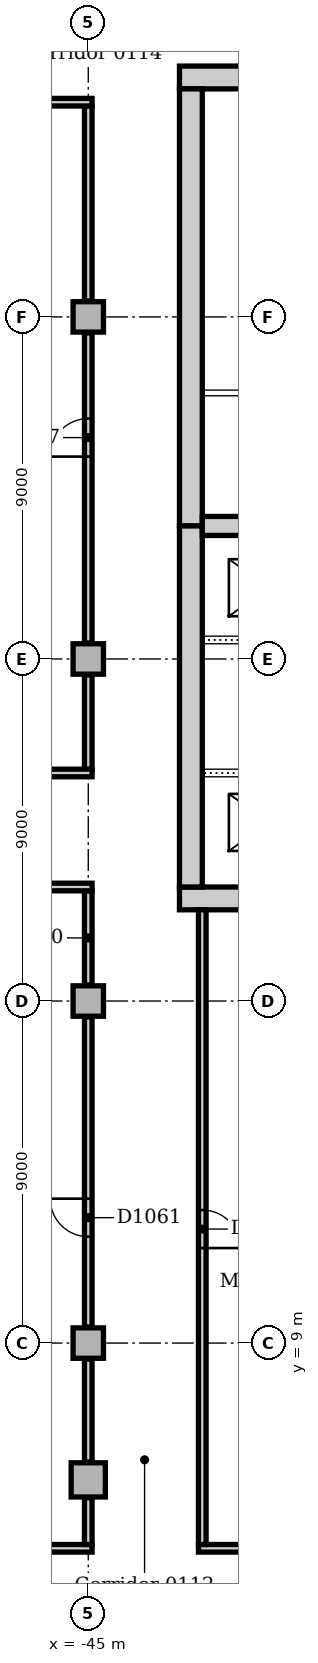
"""IFC4 building model, lengths in metres.
Left out: names, types, materials, properties, quantities, classifications, styles, units other than length and angle.
Written with IfcOpenShell. Run it as: python <this file> out.ifc"""

import sys

from ifc_helpers import new_model, si_unit, direction, frame, frame_2d, origin, origin_2d, place, context, subcontext, project, spatial, rectangle, extrude, element, fill, save


model = new_model("IFC4")
c1 = context("Model", 3, precision=1e-05, world=origin(), true_north=direction((0.0, 1.0)))
c2 = subcontext(c1, "Body", "Model", "MODEL_VIEW")
j1 = project(units=[si_unit("LENGTHUNIT", "METRE"), si_unit("PLANEANGLEUNIT", "RADIAN")], contexts=[c1])
p1 = place(None, origin())
s1 = spatial("IfcSite", under=j1, at=p1, CompositionType="ELEMENT")
p2 = place(p1, origin())
s2 = spatial("IfcBuilding", under=s1, at=p2, CompositionType="ELEMENT")
p3 = place(p2, frame((0.0, 0.0, 6.0)))
s3 = spatial("IfcBuildingStorey", under=s2, at=p3, CompositionType="ELEMENT", Elevation=6.0)
for number, where, z_axis, x_axis in (
    (1, (-42.6, 20.7, 0.0), (0.0, 0.0, 1.0), (1.0, 0.0, 0.0)),
    (2, (-30.9, 42.3, 0.0), (0.0, 0.0, 1.0), (-1.0, 0.0, 0.0)),
):
    element("IfcWall", number, at=place(p3, frame(where, z_axis=z_axis, x_axis=x_axis)), inside=s3, PredefinedType="SOLIDWALL", context=c2, shape_type="SweptSolid", body=[
        extrude(rectangle(XDim=11.7, YDim=0.6, at=frame_2d((5.85, 0.0))), origin(), (0.0, 0.0, 1.0), 5.0),
    ])
p4 = place(p3, frame((-42.3, 42.0, 0.0), z_axis=(0.0, 0.0, 1.0), x_axis=(0.0, -1.0, 0.0)))
e3 = element("IfcWall", 3, at=p4, inside=s3, PredefinedType="SOLIDWALL", context=c2, shape_type="SweptSolid", body=[
    extrude(rectangle(XDim=11.5, YDim=0.6, at=frame_2d((5.75, 0.0))), origin(), (0.0, 0.0, 1.0), 5.0),
])
p5 = place(p4, frame((8.85, 0.0, 0.0)))
e4 = element("IfcOpeningElement", 4, at=p5, cuts=e3, PredefinedType="OPENING", context=c2, shape_type="SweptSolid", body=[
    extrude(rectangle(XDim=1.8, YDim=2.1, at=frame_2d((0.9, 1.05))), frame((0.0, 0.31, 0.0), z_axis=(0.0, -1.0, 0.0), x_axis=(1.0, 0.0, 0.0)), (0.0, 0.0, 1.0), 0.62),
])
p6 = place(p3, frame((-42.3, 30.5, 0.0), z_axis=(0.0, 0.0, 1.0), x_axis=(0.0, -1.0, 0.0)))
e5 = element("IfcWall", 5, at=p6, inside=s3, PredefinedType="SOLIDWALL", context=c2, shape_type="SweptSolid", body=[
    extrude(rectangle(XDim=9.5, YDim=0.6, at=frame_2d((4.75, 0.0))), origin(), (0.0, 0.0, 1.0), 5.0),
])
p7 = place(p6, frame((3.85, 0.0, 0.0)))
e6 = element("IfcOpeningElement", 6, at=p7, cuts=e5, PredefinedType="OPENING", context=c2, shape_type="SweptSolid", body=[
    extrude(rectangle(XDim=1.8, YDim=2.1, at=frame_2d((0.9, 1.05))), frame((0.0, 0.31, 0.0), z_axis=(0.0, -1.0, 0.0), x_axis=(1.0, 0.0, 0.0)), (0.0, 0.0, 1.0), 0.62),
])
p8 = place(p3, frame((-42.0, 30.5, 0.0), z_axis=(0.0, 0.0, 1.0), x_axis=(1.0, 0.0, 0.0)))
e7 = element("IfcWall", 7, at=p8, inside=s3, PredefinedType="SOLIDWALL", context=c2, shape_type="SweptSolid", body=[
    extrude(rectangle(XDim=10.5, YDim=0.5, at=frame_2d((5.25, 0.0))), origin(), (0.0, 0.0, 1.0), 5.0),
])
p9 = place(p3, frame((-45.0, 5.4, 0.0), z_axis=(0.0, 0.0, 1.0), x_axis=(1.0, 0.0, 0.0)))
e8 = element("IfcColumn", 8, at=p9, inside=s3, PredefinedType="COLUMN", context=c2, shape_type="SweptSolid", body=[
    extrude(rectangle(XDim=0.9, YDim=0.9, at=origin_2d()), origin(), (0.0, 0.0, 1.0), 4.7),
])
for number, where, z_axis, x_axis in (
    (9, (-45.0, 9.0, 0.0), (0.0, 0.0, 1.0), (1.0, 0.0, 0.0)),
    (10, (-45.0, 18.0, 0.0), (0.0, 0.0, 1.0), (1.0, 0.0, 0.0)),
    (11, (-45.0, 27.0, 0.0), (0.0, 0.0, 1.0), (1.0, 0.0, 0.0)),
    (12, (-45.0, 36.0, 0.0), (0.0, 0.0, 1.0), (1.0, 0.0, 0.0)),
):
    element("IfcColumn", number, at=place(p3, frame(where, z_axis=z_axis, x_axis=x_axis)), inside=s3, PredefinedType="COLUMN", context=c2, shape_type="SweptSolid", body=[
        extrude(rectangle(XDim=0.8, YDim=0.8, at=origin_2d()), origin(), (0.0, 0.0, 1.0), 4.7),
    ])
p10 = place(p3, frame((-54.0, 3.6, 0.0), z_axis=(0.0, 0.0, 1.0), x_axis=(1.0, 0.0, 0.0)))
e13 = element("IfcWall", 13, at=p10, inside=s3, PredefinedType="PARTITIONING", context=c2, shape_type="SweptSolid", body=[
    extrude(rectangle(XDim=9.1, YDim=0.2, at=frame_2d((4.55, 0.0))), origin(), (0.0, 0.0, 1.0), 4.7),
])
p11 = place(p3, frame((-42.1, 3.6, 0.0), z_axis=(0.0, 0.0, 1.0), x_axis=(1.0, 0.0, 0.0)))
e14 = element("IfcWall", 14, at=p11, inside=s3, PredefinedType="PARTITIONING", context=c2, shape_type="SweptSolid", body=[
    extrude(rectangle(XDim=6.1, YDim=0.2, at=frame_2d((3.05, 0.0))), origin(), (0.0, 0.0, 1.0), 4.7),
])
p12 = place(p3, frame((-45.0, 3.7, 0.0), z_axis=(0.0, 0.0, 1.0), x_axis=(0.0, 1.0, 0.0)))
e15 = element("IfcWall", 15, at=p12, inside=s3, PredefinedType="PARTITIONING", context=c2, shape_type="SweptSolid", body=[
    extrude(rectangle(XDim=1.23, YDim=0.2, at=frame_2d((0.615, 0.0))), origin(), (0.0, 0.0, 1.0), 4.7),
])
p13 = place(p3, frame((-45.0, 5.87, 0.0), z_axis=(0.0, 0.0, 1.0), x_axis=(0.0, 1.0, 0.0)))
e16 = element("IfcWall", 16, at=p13, inside=s3, PredefinedType="PARTITIONING", context=c2, shape_type="SweptSolid", body=[
    extrude(rectangle(XDim=2.71, YDim=0.2, at=frame_2d((1.355, 0.0))), origin(), (0.0, 0.0, 1.0), 4.7),
])
p14 = place(p3, frame((-45.0, 9.42, 0.0), z_axis=(0.0, 0.0, 1.0), x_axis=(0.0, 1.0, 0.0)))
e17 = element("IfcWall", 17, at=p14, inside=s3, PredefinedType="PARTITIONING", context=c2, shape_type="SweptSolid", body=[
    extrude(rectangle(XDim=8.16, YDim=0.2, at=frame_2d((4.08, 0.0))), origin(), (0.0, 0.0, 1.0), 4.7),
])
p15 = place(p14, frame((2.38, 0.0, 0.0)))
e18 = element("IfcOpeningElement", 18, at=p15, cuts=e17, PredefinedType="OPENING", context=c2, shape_type="SweptSolid", body=[
    extrude(rectangle(XDim=1.0, YDim=2.1, at=frame_2d((0.5, 1.05))), frame((0.0, 0.11, 0.0), z_axis=(0.0, -1.0, 0.0), x_axis=(1.0, 0.0, 0.0)), (0.0, 0.0, 1.0), 0.22),
])
p16 = place(p3, frame((-45.0, 18.42, 0.0), z_axis=(0.0, 0.0, 1.0), x_axis=(0.0, 1.0, 0.0)))
e19 = element("IfcWall", 19, at=p16, inside=s3, PredefinedType="PARTITIONING", context=c2, shape_type="SweptSolid", body=[
    extrude(rectangle(XDim=2.48, YDim=0.2, at=frame_2d((1.24, 0.0))), origin(), (0.0, 0.0, 1.0), 4.7),
])
p17 = place(p3, frame((-42.0, 3.7, 0.0), z_axis=(0.0, 0.0, 1.0), x_axis=(0.0, 1.0, 0.0)))
e20 = element("IfcWall", 20, at=p17, inside=s3, PredefinedType="PARTITIONING", context=c2, shape_type="SweptSolid", body=[
    extrude(rectangle(XDim=16.7, YDim=0.2, at=frame_2d((8.35, 0.0))), origin(), (0.0, 0.0, 1.0), 4.7),
])
p18 = place(p17, frame((7.8, 0.0, 0.0)))
e21 = element("IfcOpeningElement", 21, at=p18, cuts=e20, PredefinedType="OPENING", context=c2, shape_type="SweptSolid", body=[
    extrude(rectangle(XDim=1.0, YDim=2.1, at=frame_2d((0.5, 1.05))), frame((0.0, 0.11, 0.0), z_axis=(0.0, -1.0, 0.0), x_axis=(1.0, 0.0, 0.0)), (0.0, 0.0, 1.0), 0.22),
])
p19 = place(p3, frame((-45.0, 24.1, 0.0), z_axis=(0.0, 0.0, 1.0), x_axis=(0.0, 1.0, 0.0)))
e22 = element("IfcWall", 22, at=p19, inside=s3, PredefinedType="PARTITIONING", context=c2, shape_type="SweptSolid", body=[
    extrude(rectangle(XDim=2.48, YDim=0.2, at=frame_2d((1.24, 0.0))), origin(), (0.0, 0.0, 1.0), 4.7),
])
p20 = place(p3, frame((-45.0, 27.42, 0.0), z_axis=(0.0, 0.0, 1.0), x_axis=(0.0, 1.0, 0.0)))
e23 = element("IfcWall", 23, at=p20, inside=s3, PredefinedType="PARTITIONING", context=c2, shape_type="SweptSolid", body=[
    extrude(rectangle(XDim=8.16, YDim=0.2, at=frame_2d((4.08, 0.0))), origin(), (0.0, 0.0, 1.0), 4.7),
])
p21 = place(p20, frame((4.905, 0.0, 0.0)))
e24 = element("IfcOpeningElement", 24, at=p21, cuts=e23, PredefinedType="OPENING", context=c2, shape_type="SweptSolid", body=[
    extrude(rectangle(XDim=1.0, YDim=2.1, at=frame_2d((0.5, 1.05))), frame((0.0, 0.11, 0.0), z_axis=(0.0, -1.0, 0.0), x_axis=(1.0, 0.0, 0.0)), (0.0, 0.0, 1.0), 0.22),
])
p22 = place(p3, frame((-45.0, 36.42, 0.0), z_axis=(0.0, 0.0, 1.0), x_axis=(0.0, 1.0, 0.0)))
e25 = element("IfcWall", 25, at=p22, inside=s3, PredefinedType="PARTITIONING", context=c2, shape_type="SweptSolid", body=[
    extrude(rectangle(XDim=5.13, YDim=0.2, at=frame_2d((2.565, 0.0))), origin(), (0.0, 0.0, 1.0), 4.7),
])
p23 = place(p3, frame((-54.0, 21.0, 0.0), z_axis=(0.0, 0.0, 1.0), x_axis=(1.0, 0.0, 0.0)))
e26 = element("IfcWall", 26, at=p23, inside=s3, PredefinedType="PARTITIONING", context=c2, shape_type="SweptSolid", body=[
    extrude(rectangle(XDim=9.1, YDim=0.2, at=frame_2d((4.55, 0.0))), origin(), (0.0, 0.0, 1.0), 4.7),
])
for number, where, z_axis, x_axis in (
    (27, (-52.5, 24.0, 0.0), (0.0, 0.0, 1.0), (1.0, 0.0, 0.0)),
    (28, (-52.5, 41.65, 0.0), (0.0, 0.0, 1.0), (1.0, 0.0, 0.0)),
):
    element("IfcWall", number, at=place(p3, frame(where, z_axis=z_axis, x_axis=x_axis)), inside=s3, PredefinedType="PARTITIONING", context=c2, shape_type="SweptSolid", body=[
        extrude(rectangle(XDim=7.6, YDim=0.2, at=frame_2d((3.8, 0.0))), origin(), (0.0, 0.0, 1.0), 4.7),
    ])
p24 = place(p3, frame((-38.6, 24.0, 0.0), z_axis=(0.0, 0.0, 1.0), x_axis=(-1.0, 0.0, 0.0)))
e29 = element("IfcWall", 29, at=p24, inside=s3, PredefinedType="SOLIDWALL", context=c2, shape_type="SweptSolid", body=[
    extrude(rectangle(XDim=3.4, YDim=0.2, at=frame_2d((1.7, 0.0))), origin(), (0.0, 0.0, 1.0), 5.0),
])
p25 = place(p24, frame((0.8, 0.0, 0.0)))
e30 = element("IfcOpeningElement", 30, at=p25, cuts=e29, PredefinedType="OPENING", context=c2, shape_type="SweptSolid", body=[
    extrude(rectangle(XDim=1.1, YDim=2.1, at=frame_2d((0.55, 1.05))), frame((0.0, 0.11, 0.0), z_axis=(0.0, -1.0, 0.0), x_axis=(1.0, 0.0, 0.0)), (0.0, 0.0, 1.0), 0.22),
])
p26 = place(p3, frame((-42.0, 27.5, 0.0), z_axis=(0.0, 0.0, 1.0), x_axis=(1.0, 0.0, 0.0)))
e31 = element("IfcWall", 31, at=p26, inside=s3, PredefinedType="SOLIDWALL", context=c2, shape_type="SweptSolid", body=[
    extrude(rectangle(XDim=3.4, YDim=0.2, at=frame_2d((1.7, 0.0))), origin(), (0.0, 0.0, 1.0), 5.0),
])
p27 = place(p26, frame((1.5, 0.0, 0.0)))
e32 = element("IfcOpeningElement", 32, at=p27, cuts=e31, PredefinedType="OPENING", context=c2, shape_type="SweptSolid", body=[
    extrude(rectangle(XDim=1.1, YDim=2.1, at=frame_2d((0.55, 1.05))), frame((0.0, 0.11, 0.0), z_axis=(0.0, -1.0, 0.0), x_axis=(1.0, 0.0, 0.0)), (0.0, 0.0, 1.0), 0.22),
])
p28 = place(p3, frame((-39.325, 34.0, 0.0), z_axis=(0.0, 0.0, 1.0), x_axis=(-1.0, 0.0, 0.0)))
e33 = element("IfcWall", 33, at=p28, inside=s3, PredefinedType="PARTITIONING", context=c2, shape_type="SweptSolid", body=[
    extrude(rectangle(XDim=2.675, YDim=0.15, at=frame_2d((1.337, 0.0))), origin(), (0.0, 0.0, 1.0), 4.7),
])
p29 = place(p28, frame((0.975, 0.0, 0.0)))
e34 = element("IfcOpeningElement", 34, at=p29, cuts=e33, PredefinedType="OPENING", context=c2, shape_type="SweptSolid", body=[
    extrude(rectangle(XDim=0.8, YDim=2.1, at=frame_2d((0.4, 1.05))), frame((0.0, 0.085, 0.0), z_axis=(0.0, -1.0, 0.0), x_axis=(1.0, 0.0, 0.0)), (0.0, 0.0, 1.0), 0.17),
])
p30 = place(p15, origin())
e35 = element("IfcDoor", 35, at=p30, inside=s3, OperationType="SINGLE_SWING_RIGHT", PredefinedType="DOOR", context=c2, shape_type="SweptSolid", body=[
    extrude(rectangle(XDim=1.0, YDim=2.1, at=frame_2d((0.5, 1.05))), frame((0.0, 0.025, 0.0), z_axis=(0.0, -1.0, 0.0), x_axis=(1.0, 0.0, 0.0)), (0.0, 0.0, 1.0), 0.05),
])
fill(e18, e35)
p31 = place(p18, frame((1.0, 0.0, 0.0), z_axis=(0.0, 0.0, 1.0), x_axis=(-1.0, 0.0, 0.0)))
e36 = element("IfcDoor", 36, at=p31, inside=s3, OperationType="SINGLE_SWING_RIGHT", PredefinedType="DOOR", context=c2, shape_type="SweptSolid", body=[
    extrude(rectangle(XDim=1.0, YDim=2.1, at=frame_2d((0.5, 1.05))), frame((0.0, 0.025, 0.0), z_axis=(0.0, -1.0, 0.0), x_axis=(1.0, 0.0, 0.0)), (0.0, 0.0, 1.0), 0.05),
])
fill(e21, e36)
p32 = place(p21, origin())
e37 = element("IfcDoor", 37, at=p32, inside=s3, OperationType="SINGLE_SWING_LEFT", PredefinedType="DOOR", context=c2, shape_type="SweptSolid", body=[
    extrude(rectangle(XDim=1.0, YDim=2.1, at=frame_2d((0.5, 1.05))), frame((0.0, 0.025, 0.0), z_axis=(0.0, -1.0, 0.0), x_axis=(1.0, 0.0, 0.0)), (0.0, 0.0, 1.0), 0.05),
])
fill(e24, e37)
p33 = place(p7, origin())
e38 = element("IfcDoor", 38, at=p33, inside=s3, OperationType="DOUBLE_DOOR_SINGLE_SWING", PredefinedType="DOOR", context=c2, shape_type="SweptSolid", body=[
    extrude(rectangle(XDim=1.8, YDim=2.1, at=frame_2d((0.9, 1.05))), frame((0.0, 0.025, 0.0), z_axis=(0.0, -1.0, 0.0), x_axis=(1.0, 0.0, 0.0)), (0.0, 0.0, 1.0), 0.05),
])
fill(e6, e38)
p34 = place(p5, frame((1.8, 0.0, 0.0), z_axis=(0.0, 0.0, 1.0), x_axis=(-1.0, 0.0, 0.0)))
e39 = element("IfcDoor", 39, at=p34, inside=s3, OperationType="DOUBLE_DOOR_SINGLE_SWING", PredefinedType="DOOR", context=c2, shape_type="SweptSolid", body=[
    extrude(rectangle(XDim=1.8, YDim=2.1, at=frame_2d((0.9, 1.05))), frame((0.0, 0.025, 0.0), z_axis=(0.0, -1.0, 0.0), x_axis=(1.0, 0.0, 0.0)), (0.0, 0.0, 1.0), 0.05),
])
fill(e4, e39)
p35 = place(p29, frame((0.8, 0.0, 0.0), z_axis=(0.0, 0.0, 1.0), x_axis=(-1.0, 0.0, 0.0)))
e40 = element("IfcDoor", 40, at=p35, inside=s3, OperationType="SINGLE_SWING_LEFT", PredefinedType="DOOR", context=c2, shape_type="SweptSolid", body=[
    extrude(rectangle(XDim=0.8, YDim=2.1, at=frame_2d((0.4, 1.05))), frame((0.0, 0.025, 0.0), z_axis=(0.0, -1.0, 0.0), x_axis=(1.0, 0.0, 0.0)), (0.0, 0.0, 1.0), 0.05),
])
fill(e34, e40)
save(model, sys.argv[1])
